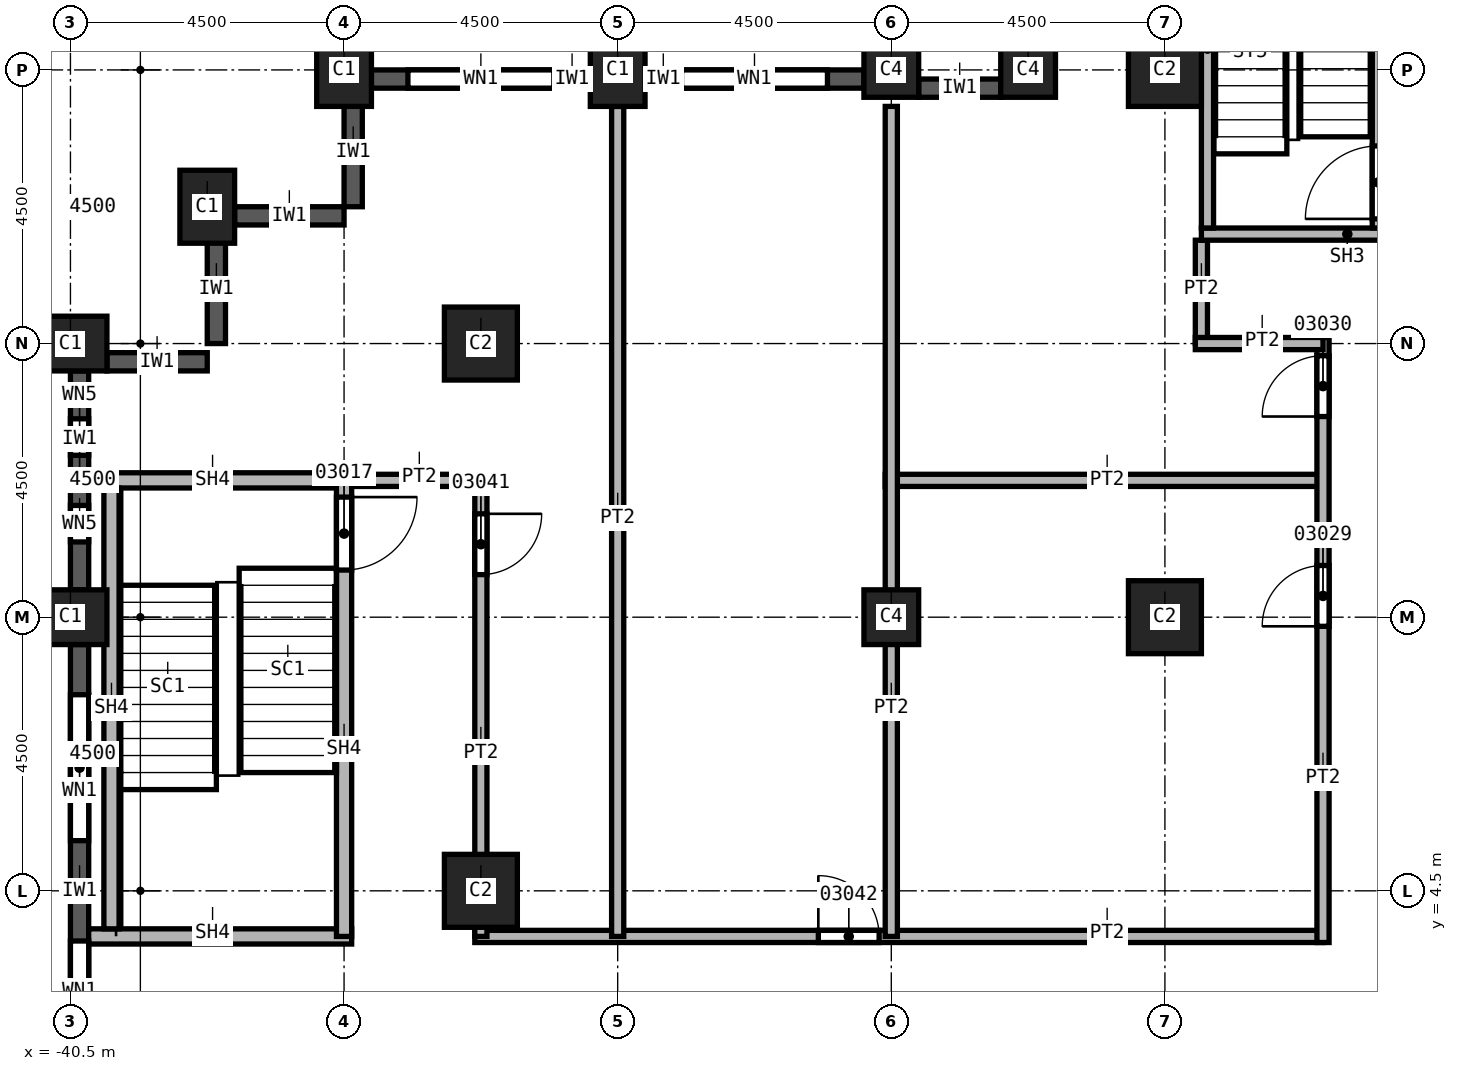
"""IFC4 building model, lengths in metres.
Left out: names, types, materials, properties, quantities, classifications, styles, units other than length and angle.
Written with IfcOpenShell. Run it as: python <this file> out.ifc"""

import sys

from ifc_helpers import new_model, si_unit, direction, frame, frame_2d, origin, origin_2d, place, context, subcontext, project, spatial, rectangle, extrude, element, fill, save


model = new_model("IFC4")
c1 = context("Model", 3, precision=1e-05, world=origin(), true_north=direction((0.0, 1.0)))
c2 = subcontext(c1, "Body", "Model", "MODEL_VIEW")
j1 = project(units=[si_unit("LENGTHUNIT", "METRE"), si_unit("PLANEANGLEUNIT", "RADIAN")], contexts=[c1])
p1 = place(None, origin())
s1 = spatial("IfcSite", under=j1, at=p1, CompositionType="ELEMENT")
p2 = place(p1, origin())
s2 = spatial("IfcBuilding", under=s1, at=p2, CompositionType="ELEMENT")
p3 = place(p2, frame((0.0, 0.0, 92.0)))
s3 = spatial("IfcBuildingStorey", under=s2, at=p3, CompositionType="ELEMENT", Elevation=92.0)
for number, where, z_axis, x_axis in (
    (1, (-40.5, 9.0, 0.0), (0.0, 0.0, 1.0), (0.0, 1.0, 0.0)),
    (2, (-40.5, 13.5, 0.0), (0.0, 0.0, 1.0), (0.0, 1.0, 0.0)),
    (3, (-38.25, 15.75, 0.0), (0.0, 0.0, 1.0), (1.0, 0.0, 0.0)),
    (4, (-31.5, 18.0, 0.0), (0.0, 0.0, 1.0), (1.0, 0.0, 0.0)),
    (5, (-36.0, 18.0, 0.0), (0.0, 0.0, 1.0), (1.0, 0.0, 0.0)),
):
    element("IfcColumn", number, at=place(p3, frame(where, z_axis=z_axis, x_axis=x_axis)), inside=s3, PredefinedType="COLUMN", context=c2, shape_type="SweptSolid", body=[
        extrude(rectangle(XDim=0.9, YDim=1.2, at=origin_2d()), origin(), (0.0, 0.0, 1.0), 3.7),
    ])
for number, where, z_axis, x_axis in (
    (6, (-33.75, 4.5, 0.0), (0.0, 0.0, 1.0), (1.0, 0.0, 0.0)),
    (7, (-33.75, 13.5, 0.0), (0.0, 0.0, 1.0), (1.0, 0.0, 0.0)),
    (8, (-22.5, 9.0, 0.0), (0.0, 0.0, 1.0), (1.0, 0.0, 0.0)),
    (9, (-22.5, 18.0, 0.0), (0.0, 0.0, 1.0), (1.0, 0.0, 0.0)),
):
    element("IfcColumn", number, at=place(p3, frame(where, z_axis=z_axis, x_axis=x_axis)), inside=s3, PredefinedType="COLUMN", context=c2, shape_type="SweptSolid", body=[
        extrude(rectangle(XDim=1.2, YDim=1.2, at=origin_2d()), origin(), (0.0, 0.0, 1.0), 3.7),
    ])
for number, where, z_axis, x_axis in (
    (10, (-27.0, 9.0, 0.0), (0.0, 0.0, 1.0), (1.0, 0.0, 0.0)),
    (11, (-27.0, 18.0, 0.0), (0.0, 0.0, 1.0), (1.0, 0.0, 0.0)),
    (12, (-24.75, 18.0, 0.0), (0.0, 0.0, 1.0), (1.0, 0.0, 0.0)),
):
    element("IfcColumn", number, at=place(p3, frame(where, z_axis=z_axis, x_axis=x_axis)), inside=s3, PredefinedType="COLUMN", context=c2, shape_type="SweptSolid", body=[
        extrude(rectangle(XDim=0.9, YDim=0.9, at=origin_2d()), origin(), (0.0, 0.0, 1.0), 3.7),
    ])
for number, where, z_axis, x_axis in (
    (13, (-35.85, 17.55, 0.0), (0.0, 0.0, 1.0), (0.0, -1.0, 0.0)),
    (14, (-37.8, 15.6, 0.0), (0.0, 0.0, 1.0), (1.0, 0.0, 0.0)),
    (15, (-38.1, 15.3, 0.0), (0.0, 0.0, 1.0), (0.0, -1.0, 0.0)),
):
    element("IfcWall", number, at=place(p3, frame(where, z_axis=z_axis, x_axis=x_axis)), inside=s3, PredefinedType="SOLIDWALL", context=c2, shape_type="SweptSolid", body=[
        extrude(rectangle(XDim=1.8, YDim=0.3, at=frame_2d((0.9, 0.0))), origin(), (0.0, 0.0, 1.0), 3.1),
    ])
p4 = place(p3, frame((-39.9, 13.2, 0.0), z_axis=(0.0, 0.0, 1.0), x_axis=(1.0, 0.0, 0.0)))
e16 = element("IfcWall", 16, at=p4, inside=s3, PredefinedType="SOLIDWALL", context=c2, shape_type="SweptSolid", body=[
    extrude(rectangle(XDim=1.65, YDim=0.3, at=frame_2d((0.825, 0.0))), origin(), (0.0, 0.0, 1.0), 3.1),
])
p5 = place(p3, frame((-25.2, 17.7, 0.0), z_axis=(0.0, 0.0, 1.0), x_axis=(-1.0, 0.0, 0.0)))
e17 = element("IfcWall", 17, at=p5, inside=s3, PredefinedType="SOLIDWALL", context=c2, shape_type="SweptSolid", body=[
    extrude(rectangle(XDim=1.35, YDim=0.3, at=frame_2d((0.675, 0.0))), origin(), (0.0, 0.0, 1.0), 3.1),
])
p6 = place(p3, frame((-27.45, 17.85, 0.0), z_axis=(0.0, 0.0, 1.0), x_axis=(-1.0, 0.0, 0.0)))
e18 = element("IfcWall", 18, at=p6, inside=s3, PredefinedType="SOLIDWALL", context=c2, shape_type="SweptSolid", body=[
    extrude(rectangle(XDim=3.6, YDim=0.3, at=frame_2d((1.8, 0.0))), origin(), (0.0, 0.0, 1.0), 3.1),
])
p7 = place(p6, frame((0.6, 0.0, 0.8)))
e19 = element("IfcOpeningElement", 19, at=p7, cuts=e18, PredefinedType="OPENING", context=c2, shape_type="SweptSolid", body=[
    extrude(rectangle(XDim=2.4, YDim=1.95, at=frame_2d((1.2, 0.975))), frame((0.0, 0.15, 0.0), z_axis=(0.0, -1.0, 0.0), x_axis=(1.0, 0.0, 0.0)), (0.0, 0.0, 1.0), 0.3),
])
p8 = place(p3, frame((-31.95, 17.85, 0.0), z_axis=(0.0, 0.0, 1.0), x_axis=(-1.0, 0.0, 0.0)))
e20 = element("IfcWall", 20, at=p8, inside=s3, PredefinedType="SOLIDWALL", context=c2, shape_type="SweptSolid", body=[
    extrude(rectangle(XDim=3.6, YDim=0.3, at=frame_2d((1.8, 0.0))), origin(), (0.0, 0.0, 1.0), 3.1),
])
p9 = place(p8, frame((0.6, 0.0, 0.8)))
e21 = element("IfcOpeningElement", 21, at=p9, cuts=e20, PredefinedType="OPENING", context=c2, shape_type="SweptSolid", body=[
    extrude(rectangle(XDim=2.4, YDim=1.95, at=frame_2d((1.2, 0.975))), frame((0.0, 0.15, 0.0), z_axis=(0.0, -1.0, 0.0), x_axis=(1.0, 0.0, 0.0)), (0.0, 0.0, 1.0), 0.3),
])
p10 = place(p3, frame((-40.35, 13.05, 0.0), z_axis=(0.0, 0.0, 1.0), x_axis=(0.0, -1.0, 0.0)))
e22 = element("IfcWall", 22, at=p10, inside=s3, PredefinedType="SOLIDWALL", context=c2, shape_type="SweptSolid", body=[
    extrude(rectangle(XDim=3.6, YDim=0.3, at=frame_2d((1.8, 0.0))), origin(), (0.0, 0.0, 1.0), 3.1),
])
p11 = place(p10, frame((0.788, 0.0, 0.8)))
e23 = element("IfcOpeningElement", 23, at=p11, cuts=e22, PredefinedType="OPENING", context=c2, shape_type="SweptSolid", body=[
    extrude(rectangle(XDim=0.6, YDim=1.95, at=frame_2d((0.3, 0.975))), frame((0.0, 0.15, 0.0), z_axis=(0.0, -1.0, 0.0), x_axis=(1.0, 0.0, 0.0)), (0.0, 0.0, 1.0), 0.3),
])
p12 = place(p10, frame((2.212, 0.0, 0.8)))
e24 = element("IfcOpeningElement", 24, at=p12, cuts=e22, PredefinedType="OPENING", context=c2, shape_type="SweptSolid", body=[
    extrude(rectangle(XDim=0.6, YDim=1.95, at=frame_2d((0.3, 0.975))), frame((0.0, 0.15, 0.0), z_axis=(0.0, -1.0, 0.0), x_axis=(1.0, 0.0, 0.0)), (0.0, 0.0, 1.0), 0.3),
])
p13 = place(p3, frame((-40.35, 8.55, 0.0), z_axis=(0.0, 0.0, 1.0), x_axis=(0.0, -1.0, 0.0)))
e25 = element("IfcWall", 25, at=p13, inside=s3, PredefinedType="SOLIDWALL", context=c2, shape_type="SweptSolid", body=[
    extrude(rectangle(XDim=8.1, YDim=0.3, at=frame_2d((4.05, 0.0))), origin(), (0.0, 0.0, 1.0), 3.1),
])
p14 = place(p13, frame((0.825, 0.0, 0.8)))
e26 = element("IfcOpeningElement", 26, at=p14, cuts=e25, PredefinedType="OPENING", context=c2, shape_type="SweptSolid", body=[
    extrude(rectangle(XDim=2.4, YDim=1.95, at=frame_2d((1.2, 0.975))), frame((0.0, 0.15, 0.0), z_axis=(0.0, -1.0, 0.0), x_axis=(1.0, 0.0, 0.0)), (0.0, 0.0, 1.0), 0.3),
])
p15 = place(p13, frame((4.875, 0.0, 0.8)))
e27 = element("IfcOpeningElement", 27, at=p15, cuts=e25, PredefinedType="OPENING", context=c2, shape_type="SweptSolid", body=[
    extrude(rectangle(XDim=2.4, YDim=1.95, at=frame_2d((1.2, 0.975))), frame((0.0, 0.15, 0.0), z_axis=(0.0, -1.0, 0.0), x_axis=(1.0, 0.0, 0.0)), (0.0, 0.0, 1.0), 0.3),
])
p16 = place(p3, frame((-36.0, 11.25, 0.0), z_axis=(0.0, 0.0, 1.0), x_axis=(1.0, 0.0, 0.0)))
e28 = element("IfcWall", 28, at=p16, inside=s3, PredefinedType="PARTITIONING", context=c2, shape_type="SweptSolid", body=[
    extrude(rectangle(XDim=2.35, YDim=0.2, at=frame_2d((1.175, 0.0))), origin(), (0.0, 0.0, 1.0), 3.7),
])
p17 = place(p3, frame((-33.85, 3.75, 0.0), z_axis=(0.0, 0.0, 1.0), x_axis=(1.0, 0.0, 0.0)))
e29 = element("IfcWall", 29, at=p17, inside=s3, PredefinedType="PARTITIONING", context=c2, shape_type="SweptSolid", body=[
    extrude(rectangle(XDim=13.95, YDim=0.2, at=frame_2d((6.975, 0.0))), origin(), (0.0, 0.0, 1.0), 3.7),
])
p18 = place(p17, frame((5.65, 0.0, 0.0)))
e30 = element("IfcOpeningElement", 30, at=p18, cuts=e29, PredefinedType="OPENING", context=c2, shape_type="SweptSolid", body=[
    extrude(rectangle(XDim=1.0, YDim=2.1, at=frame_2d((0.5, 1.05))), frame((0.0, 0.1, 0.0), z_axis=(0.0, -1.0, 0.0), x_axis=(1.0, 0.0, 0.0)), (0.0, 0.0, 1.0), 0.2),
])
p19 = place(p3, frame((-33.75, 11.25, 0.0), z_axis=(0.0, 0.0, 1.0), x_axis=(0.0, -1.0, 0.0)))
e31 = element("IfcWall", 31, at=p19, inside=s3, PredefinedType="PARTITIONING", context=c2, shape_type="SweptSolid", body=[
    extrude(rectangle(XDim=7.5, YDim=0.2, at=frame_2d((3.75, 0.0))), origin(), (0.0, 0.0, 1.0), 3.7),
])
p20 = place(p19, frame((0.55, 0.0, 0.0)))
e32 = element("IfcOpeningElement", 32, at=p20, cuts=e31, PredefinedType="OPENING", context=c2, shape_type="SweptSolid", body=[
    extrude(rectangle(XDim=1.0, YDim=2.1, at=frame_2d((0.5, 1.05))), frame((0.0, 0.1, 0.0), z_axis=(0.0, -1.0, 0.0), x_axis=(1.0, 0.0, 0.0)), (0.0, 0.0, 1.0), 0.2),
])
p21 = place(p3, frame((-31.5, 17.4, 0.0), z_axis=(0.0, 0.0, 1.0), x_axis=(0.0, -1.0, 0.0)))
e33 = element("IfcWall", 33, at=p21, inside=s3, PredefinedType="PARTITIONING", context=c2, shape_type="SweptSolid", body=[
    extrude(rectangle(XDim=13.65, YDim=0.2, at=frame_2d((6.825, 0.0))), origin(), (0.0, 0.0, 1.0), 3.7),
])
p22 = place(p3, frame((-27.1, 11.25, 0.0), z_axis=(0.0, 0.0, 1.0), x_axis=(1.0, 0.0, 0.0)))
e34 = element("IfcWall", 34, at=p22, inside=s3, PredefinedType="PARTITIONING", context=c2, shape_type="SweptSolid", body=[
    extrude(rectangle(XDim=7.2, YDim=0.2, at=frame_2d((3.6, 0.0))), origin(), (0.0, 0.0, 1.0), 3.7),
])
p23 = place(p3, frame((-27.0, 3.75, 0.0), z_axis=(0.0, 0.0, 1.0), x_axis=(0.0, 1.0, 0.0)))
e35 = element("IfcWall", 35, at=p23, inside=s3, PredefinedType="PARTITIONING", context=c2, shape_type="SweptSolid", body=[
    extrude(rectangle(XDim=13.65, YDim=0.2, at=frame_2d((6.825, 0.0))), origin(), (0.0, 0.0, 1.0), 3.7),
])
p24 = place(p3, frame((-21.9, 13.5, 0.0), z_axis=(0.0, 0.0, 1.0), x_axis=(0.0, 1.0, 0.0)))
e36 = element("IfcWall", 36, at=p24, inside=s3, PredefinedType="PARTITIONING", context=c2, shape_type="SweptSolid", body=[
    extrude(rectangle(XDim=1.7, YDim=0.2, at=frame_2d((0.85, 0.0))), origin(), (0.0, 0.0, 1.0), 3.7),
])
p25 = place(p3, frame((-19.9, 3.65, 0.0), z_axis=(0.0, 0.0, 1.0), x_axis=(0.0, 1.0, 0.0)))
e37 = element("IfcWall", 37, at=p25, inside=s3, PredefinedType="PARTITIONING", context=c2, shape_type="SweptSolid", body=[
    extrude(rectangle(XDim=9.95, YDim=0.2, at=frame_2d((4.975, 0.0))), origin(), (0.0, 0.0, 1.0), 3.7),
])
p26 = place(p25, frame((5.2, 0.0, 0.0)))
e38 = element("IfcOpeningElement", 38, at=p26, cuts=e37, PredefinedType="OPENING", context=c2, shape_type="SweptSolid", body=[
    extrude(rectangle(XDim=1.0, YDim=2.1, at=frame_2d((0.5, 1.05))), frame((0.0, 0.1, 0.0), z_axis=(0.0, -1.0, 0.0), x_axis=(1.0, 0.0, 0.0)), (0.0, 0.0, 1.0), 0.2),
])
p27 = place(p25, frame((8.65, 0.0, 0.0)))
e39 = element("IfcOpeningElement", 39, at=p27, cuts=e37, PredefinedType="OPENING", context=c2, shape_type="SweptSolid", body=[
    extrude(rectangle(XDim=1.0, YDim=2.1, at=frame_2d((0.5, 1.05))), frame((0.0, 0.1, 0.0), z_axis=(0.0, -1.0, 0.0), x_axis=(1.0, 0.0, 0.0)), (0.0, 0.0, 1.0), 0.2),
])
p28 = place(p3, frame((-19.9, 13.5, 0.0), z_axis=(0.0, 0.0, 1.0), x_axis=(-1.0, 0.0, 0.0)))
e40 = element("IfcWall", 40, at=p28, inside=s3, PredefinedType="PARTITIONING", context=c2, shape_type="SweptSolid", body=[
    extrude(rectangle(XDim=2.1, YDim=0.2, at=frame_2d((1.05, 0.0))), origin(), (0.0, 0.0, 1.0), 3.7),
])
p29 = place(p3, frame((-40.2, 3.75, 0.0), z_axis=(0.0, 0.0, 1.0), x_axis=(1.0, 0.0, 0.0)))
e41 = element("IfcWall", 41, at=p29, inside=s3, PredefinedType="SOLIDWALL", context=c2, shape_type="SweptSolid", body=[
    extrude(rectangle(XDim=4.325, YDim=0.25, at=frame_2d((2.163, 0.0))), origin(), (0.0, 0.0, 1.0), 3.7),
])
p30 = place(p3, frame((-40.2, 11.25, 0.0), z_axis=(0.0, 0.0, 1.0), x_axis=(1.0, 0.0, 0.0)))
e42 = element("IfcWall", 42, at=p30, inside=s3, PredefinedType="SOLIDWALL", context=c2, shape_type="SweptSolid", body=[
    extrude(rectangle(XDim=4.2, YDim=0.25, at=frame_2d((2.1, 0.0))), origin(), (0.0, 0.0, 1.0), 3.7),
])
p31 = place(p3, frame((-36.0, 11.375, 0.0), z_axis=(0.0, 0.0, 1.0), x_axis=(0.0, -1.0, 0.0)))
e43 = element("IfcWall", 43, at=p31, inside=s3, PredefinedType="SOLIDWALL", context=c2, shape_type="SweptSolid", body=[
    extrude(rectangle(XDim=7.625, YDim=0.25, at=frame_2d((3.812, 0.0))), origin(), (0.0, 0.0, 1.0), 3.7),
])
p32 = place(p31, frame((0.4, 0.0, 0.0)))
e44 = element("IfcOpeningElement", 44, at=p32, cuts=e43, PredefinedType="OPENING", context=c2, shape_type="SweptSolid", body=[
    extrude(rectangle(XDim=1.2, YDim=2.1, at=frame_2d((0.6, 1.05))), frame((0.0, 0.125, 0.0), z_axis=(0.0, -1.0, 0.0), x_axis=(1.0, 0.0, 0.0)), (0.0, 0.0, 1.0), 0.25),
])
p33 = place(p3, frame((-21.9, 15.3, 0.0), z_axis=(0.0, 0.0, 1.0), x_axis=(1.0, 0.0, 0.0)))
e45 = element("IfcWall", 45, at=p33, inside=s3, PredefinedType="SOLIDWALL", context=c2, shape_type="SweptSolid", body=[
    extrude(rectangle(XDim=8.275, YDim=0.2, at=frame_2d((4.137, 0.0))), origin(), (0.0, 0.0, 1.0), 3.7),
])
p34 = place(p33, frame((4.8, 0.0, 0.0)))
e46 = element("IfcOpeningElement", 46, at=p34, cuts=e45, PredefinedType="OPENING", context=c2, shape_type="SweptSolid", body=[
    extrude(rectangle(XDim=1.2, YDim=2.1, at=frame_2d((0.6, 1.05))), frame((0.0, 0.1, 0.0), z_axis=(0.0, -1.0, 0.0), x_axis=(1.0, 0.0, 0.0)), (0.0, 0.0, 1.0), 0.2),
])
p35 = place(p3, frame((-21.8, 15.4, 0.0), z_axis=(0.0, 0.0, 1.0), x_axis=(0.0, 1.0, 0.0)))
e47 = element("IfcWall", 47, at=p35, inside=s3, PredefinedType="SOLIDWALL", context=c2, shape_type="SweptSolid", body=[
    extrude(rectangle(XDim=5.9, YDim=0.2, at=frame_2d((2.95, 0.0))), origin(), (0.0, 0.0, 1.0), 3.7),
])
p36 = place(p3, frame((-18.99, 15.4, 0.0), z_axis=(0.0, 0.0, 1.0), x_axis=(0.0, 1.0, 0.0)))
e48 = element("IfcWall", 48, at=p36, inside=s3, PredefinedType="SOLIDWALL", context=c2, shape_type="SweptSolid", body=[
    extrude(rectangle(XDim=5.9, YDim=0.2, at=frame_2d((2.95, 0.0))), origin(), (0.0, 0.0, 1.0), 3.7),
])
p37 = place(p36, frame((0.15, 0.0, 0.0)))
e49 = element("IfcOpeningElement", 49, at=p37, cuts=e48, PredefinedType="OPENING", context=c2, shape_type="SweptSolid", body=[
    extrude(rectangle(XDim=1.2, YDim=2.1, at=frame_2d((0.6, 1.05))), frame((0.0, 0.1, 0.0), z_axis=(0.0, -1.0, 0.0), x_axis=(1.0, 0.0, 0.0)), (0.0, 0.0, 1.0), 0.2),
])
p38 = place(p3, frame((-39.825, 3.875, 0.0), z_axis=(0.0, 0.0, 1.0), x_axis=(0.0, 1.0, 0.0)))
e50 = element("IfcWall", 50, at=p38, inside=s3, PredefinedType="SOLIDWALL", context=c2, shape_type="SweptSolid", body=[
    extrude(rectangle(XDim=7.25, YDim=0.25, at=frame_2d((3.625, 0.0))), origin(), (0.0, 0.0, 1.0), 3.7),
])
p39 = place(p7, origin())
e51 = element("IfcWindow", 51, at=p39, inside=s3, PartitioningType="SINGLE_PANEL", PredefinedType="WINDOW", context=c2, shape_type="SweptSolid", body=[
    extrude(rectangle(XDim=2.4, YDim=1.95, at=frame_2d((1.2, 0.975))), frame((0.0, 0.03, 0.0), z_axis=(0.0, -1.0, 0.0), x_axis=(1.0, 0.0, 0.0)), (0.0, 0.0, 1.0), 0.06),
])
fill(e19, e51)
p40 = place(p9, origin())
e52 = element("IfcWindow", 52, at=p40, inside=s3, PartitioningType="SINGLE_PANEL", PredefinedType="WINDOW", context=c2, shape_type="SweptSolid", body=[
    extrude(rectangle(XDim=2.4, YDim=1.95, at=frame_2d((1.2, 0.975))), frame((0.0, 0.03, 0.0), z_axis=(0.0, -1.0, 0.0), x_axis=(1.0, 0.0, 0.0)), (0.0, 0.0, 1.0), 0.06),
])
fill(e21, e52)
p41 = place(p14, origin())
e53 = element("IfcWindow", 53, at=p41, inside=s3, PartitioningType="SINGLE_PANEL", PredefinedType="WINDOW", context=c2, shape_type="SweptSolid", body=[
    extrude(rectangle(XDim=2.4, YDim=1.95, at=frame_2d((1.2, 0.975))), frame((0.0, 0.03, 0.0), z_axis=(0.0, -1.0, 0.0), x_axis=(1.0, 0.0, 0.0)), (0.0, 0.0, 1.0), 0.06),
])
fill(e26, e53)
p42 = place(p15, origin())
e54 = element("IfcWindow", 54, at=p42, inside=s3, PartitioningType="SINGLE_PANEL", PredefinedType="WINDOW", context=c2, shape_type="SweptSolid", body=[
    extrude(rectangle(XDim=2.4, YDim=1.95, at=frame_2d((1.2, 0.975))), frame((0.0, 0.03, 0.0), z_axis=(0.0, -1.0, 0.0), x_axis=(1.0, 0.0, 0.0)), (0.0, 0.0, 1.0), 0.06),
])
fill(e27, e54)
p43 = place(p32, origin())
e55 = element("IfcDoor", 55, at=p43, inside=s3, OperationType="SINGLE_SWING_RIGHT", PredefinedType="DOOR", context=c2, shape_type="SweptSolid", body=[
    extrude(rectangle(XDim=1.2, YDim=2.1, at=frame_2d((0.6, 1.05))), frame((0.0, 0.025, 0.0), z_axis=(0.0, -1.0, 0.0), x_axis=(1.0, 0.0, 0.0)), (0.0, 0.0, 1.0), 0.05),
])
fill(e44, e55)
p44 = place(p26, origin())
e56 = element("IfcDoor", 56, at=p44, inside=s3, OperationType="SINGLE_SWING_RIGHT", PredefinedType="DOOR", context=c2, shape_type="SweptSolid", body=[
    extrude(rectangle(XDim=1.0, YDim=2.1, at=frame_2d((0.5, 1.05))), frame((0.0, 0.025, 0.0), z_axis=(0.0, -1.0, 0.0), x_axis=(1.0, 0.0, 0.0)), (0.0, 0.0, 1.0), 0.05),
])
fill(e38, e56)
p45 = place(p27, origin())
e57 = element("IfcDoor", 57, at=p45, inside=s3, OperationType="SINGLE_SWING_LEFT", PredefinedType="DOOR", context=c2, shape_type="SweptSolid", body=[
    extrude(rectangle(XDim=1.0, YDim=2.1, at=frame_2d((0.5, 1.05))), frame((0.0, 0.025, 0.0), z_axis=(0.0, -1.0, 0.0), x_axis=(1.0, 0.0, 0.0)), (0.0, 0.0, 1.0), 0.05),
])
fill(e39, e57)
p46 = place(p20, origin())
e58 = element("IfcDoor", 58, at=p46, inside=s3, OperationType="SINGLE_SWING_RIGHT", PredefinedType="DOOR", context=c2, shape_type="SweptSolid", body=[
    extrude(rectangle(XDim=1.0, YDim=2.1, at=frame_2d((0.5, 1.05))), frame((0.0, 0.025, 0.0), z_axis=(0.0, -1.0, 0.0), x_axis=(1.0, 0.0, 0.0)), (0.0, 0.0, 1.0), 0.05),
])
fill(e32, e58)
p47 = place(p18, origin())
e59 = element("IfcDoor", 59, at=p47, inside=s3, OperationType="SINGLE_SWING_LEFT", PredefinedType="DOOR", context=c2, shape_type="SweptSolid", body=[
    extrude(rectangle(XDim=1.0, YDim=2.1, at=frame_2d((0.5, 1.05))), frame((0.0, 0.025, 0.0), z_axis=(0.0, -1.0, 0.0), x_axis=(1.0, 0.0, 0.0)), (0.0, 0.0, 1.0), 0.05),
])
fill(e30, e59)
p48 = place(p37, origin())
e60 = element("IfcDoor", 60, at=p48, inside=s3, OperationType="SINGLE_SWING_LEFT", PredefinedType="DOOR", context=c2, shape_type="SweptSolid", body=[
    extrude(rectangle(XDim=1.2, YDim=2.1, at=frame_2d((0.6, 1.05))), frame((0.0, 0.025, 0.0), z_axis=(0.0, -1.0, 0.0), x_axis=(1.0, 0.0, 0.0)), (0.0, 0.0, 1.0), 0.05),
])
fill(e49, e60)
p49 = place(p11, origin())
e61 = element("IfcWindow", 61, at=p49, inside=s3, PartitioningType="SINGLE_PANEL", PredefinedType="WINDOW", context=c2, shape_type="SweptSolid", body=[
    extrude(rectangle(XDim=0.6, YDim=1.95, at=frame_2d((0.3, 0.975))), frame((0.0, 0.03, 0.0), z_axis=(0.0, -1.0, 0.0), x_axis=(1.0, 0.0, 0.0)), (0.0, 0.0, 1.0), 0.06),
])
fill(e23, e61)
p50 = place(p12, origin())
e62 = element("IfcWindow", 62, at=p50, inside=s3, PartitioningType="SINGLE_PANEL", PredefinedType="WINDOW", context=c2, shape_type="SweptSolid", body=[
    extrude(rectangle(XDim=0.6, YDim=1.95, at=frame_2d((0.3, 0.975))), frame((0.0, 0.03, 0.0), z_axis=(0.0, -1.0, 0.0), x_axis=(1.0, 0.0, 0.0)), (0.0, 0.0, 1.0), 0.06),
])
fill(e24, e62)
save(model, sys.argv[1])
